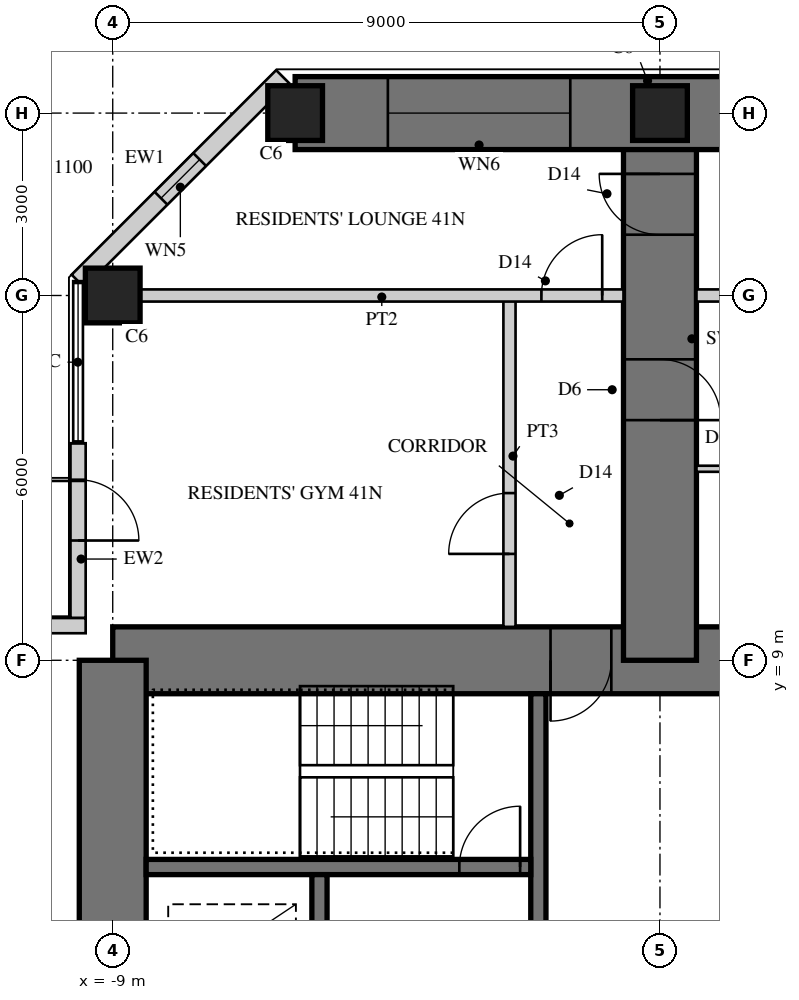
"""IFC4 building model, lengths in metres.
Left out: names, types, materials, properties, quantities, classifications, styles, units other than length and angle.
Written with IfcOpenShell. Run it as: python <this file> out.ifc"""

import sys

from ifc_helpers import new_model, si_unit, direction, frame, frame_2d, origin, origin_2d, place, context, subcontext, project, spatial, rectangle, hollow_rectangle, extrude, element, fill, save


model = new_model("IFC4")
c1 = context("Model", 3, precision=1e-05, world=origin(), true_north=direction((0.0, 1.0)))
c2 = subcontext(c1, "Body", "Model", "MODEL_VIEW")
j1 = project(units=[si_unit("LENGTHUNIT", "METRE"), si_unit("PLANEANGLEUNIT", "RADIAN")], contexts=[c1])
p1 = place(None, origin())
s1 = spatial("IfcSite", under=j1, at=p1, CompositionType="ELEMENT")
p2 = place(p1, origin())
s2 = spatial("IfcBuilding", under=s1, at=p2, CompositionType="ELEMENT")
p3 = place(p2, frame((0.0, 0.0, 169.5)))
s3 = spatial("IfcBuildingStorey", under=s2, at=p3, CompositionType="ELEMENT", Elevation=169.5)
p4 = place(p3, frame((9.0, 9.0, 0.0), z_axis=(0.0, 0.0, 1.0), x_axis=(-1.0, 0.0, 0.0)))
e1 = element("IfcWall", 1, at=p4, inside=s3, PredefinedType="SHEAR", context=c2, shape_type="SweptSolid", body=[
    extrude(rectangle(XDim=18.0, YDim=1.1, at=frame_2d((9.0, 0.0))), origin(), (0.0, 0.0, 1.0), 3.4),
])
p5 = place(p4, frame((9.8, 0.0, 0.0)))
e2 = element("IfcOpeningElement", 2, at=p5, cuts=e1, PredefinedType="OPENING", context=c2, shape_type="SweptSolid", body=[
    extrude(rectangle(XDim=1.0, YDim=2.4, at=frame_2d((0.5, 1.2))), frame((0.0, 0.56, 0.0), z_axis=(0.0, -1.0, 0.0), x_axis=(1.0, 0.0, 0.0)), (0.0, 0.0, 1.0), 1.12),
])
p6 = place(p3, frame((-9.0, 9.0, 0.0), z_axis=(0.0, 0.0, 1.0), x_axis=(0.0, -1.0, 0.0)))
e3 = element("IfcWall", 3, at=p6, inside=s3, PredefinedType="SHEAR", context=c2, shape_type="SweptSolid", body=[
    extrude(rectangle(XDim=18.0, YDim=1.1, at=frame_2d((9.0, 0.0))), origin(), (0.0, 0.0, 1.0), 3.4),
])
p7 = place(p6, frame((9.8, 0.0, 0.0)))
e4 = element("IfcOpeningElement", 4, at=p7, cuts=e3, PredefinedType="OPENING", context=c2, shape_type="SweptSolid", body=[
    extrude(rectangle(XDim=1.0, YDim=2.4, at=frame_2d((0.5, 1.2))), frame((0.0, 0.56, 0.0), z_axis=(0.0, -1.0, 0.0), x_axis=(1.0, 0.0, 0.0)), (0.0, 0.0, 1.0), 1.12),
])
p8 = place(p3, frame((-2.0, 1.675, 0.0), z_axis=(0.0, 0.0, 1.0), x_axis=(0.0, 1.0, 0.0)))
e5 = element("IfcWall", 5, at=p8, inside=s3, PredefinedType="SHEAR", context=c2, shape_type="SweptSolid", body=[
    extrude(rectangle(XDim=6.775, YDim=0.25, at=frame_2d((3.387, 0.0))), origin(), (0.0, 0.0, 1.0), 3.4),
])
p9 = place(p8, frame((0.725, 0.0, 0.0)))
e6 = element("IfcOpeningElement", 6, at=p9, cuts=e5, PredefinedType="OPENING", context=c2, shape_type="SweptSolid", body=[
    extrude(rectangle(XDim=1.0, YDim=2.1, at=frame_2d((0.5, 1.05))), frame((0.0, 0.135, 0.0), z_axis=(0.0, -1.0, 0.0), x_axis=(1.0, 0.0, 0.0)), (0.0, 0.0, 1.0), 0.27),
])
p10 = place(p3, frame((-2.125, 5.6, 0.0), z_axis=(0.0, 0.0, 1.0), x_axis=(-1.0, 0.0, 0.0)))
e7 = element("IfcWall", 7, at=p10, inside=s3, PredefinedType="SHEAR", context=c2, shape_type="SweptSolid", body=[
    extrude(rectangle(XDim=6.325, YDim=0.25, at=frame_2d((3.163, 0.0))), origin(), (0.0, 0.0, 1.0), 3.4),
])
p11 = place(p10, frame((0.175, 0.0, 0.0)))
e8 = element("IfcOpeningElement", 8, at=p11, cuts=e7, PredefinedType="OPENING", context=c2, shape_type="SweptSolid", body=[
    extrude(rectangle(XDim=1.0, YDim=2.1, at=frame_2d((0.5, 1.05))), frame((0.0, 0.135, 0.0), z_axis=(0.0, -1.0, 0.0), x_axis=(1.0, 0.0, 0.0)), (0.0, 0.0, 1.0), 0.27),
])
p12 = place(p3, frame((-5.6, 1.925, 0.0), z_axis=(0.0, 0.0, 1.0), x_axis=(0.0, 1.0, 0.0)))
e9 = element("IfcWall", 9, at=p12, inside=s3, PredefinedType="SHEAR", context=c2, shape_type="SweptSolid", body=[
    extrude(rectangle(XDim=3.55, YDim=0.25, at=frame_2d((1.775, 0.0))), origin(), (0.0, 0.0, 1.0), 3.4),
])
p13 = place(p12, frame((1.525, 0.0, 0.0)))
e10 = element("IfcOpeningElement", 10, at=p13, cuts=e9, PredefinedType="OPENING", context=c2, shape_type="SweptSolid", body=[
    extrude(rectangle(XDim=1.1, YDim=2.2, at=frame_2d((0.55, 1.1))), frame((0.0, 0.135, 0.0), z_axis=(0.0, -1.0, 0.0), x_axis=(1.0, 0.0, 0.0)), (0.0, 0.0, 1.0), 0.27),
])
p14 = place(p12, frame((0.075, 0.0, 0.0)))
e11 = element("IfcOpeningElement", 11, at=p14, cuts=e9, PredefinedType="OPENING", context=c2, shape_type="SweptSolid", body=[
    extrude(rectangle(XDim=0.8, YDim=2.1, at=frame_2d((0.4, 1.05))), frame((0.0, 0.135, 0.0), z_axis=(0.0, -1.0, 0.0), x_axis=(1.0, 0.0, 0.0)), (0.0, 0.0, 1.0), 0.27),
])
p15 = place(p3, frame((0.0, 9.0, 0.0), z_axis=(0.0, 0.0, 1.0), x_axis=(0.0, 1.0, 0.0)))
e12 = element("IfcWall", 12, at=p15, inside=s3, PredefinedType="SHEAR", context=c2, shape_type="SweptSolid", body=[
    extrude(rectangle(XDim=9.0, YDim=1.2, at=frame_2d((4.5, 0.0))), origin(), (0.0, 0.0, 1.0), 3.4),
])
p16 = place(p15, frame((3.95, 0.0, 0.0)))
e13 = element("IfcOpeningElement", 13, at=p16, cuts=e12, PredefinedType="OPENING", context=c2, shape_type="SweptSolid", body=[
    extrude(rectangle(XDim=1.0, YDim=2.15, at=frame_2d((0.5, 1.075))), frame((0.0, 0.61, 0.0), z_axis=(0.0, -1.0, 0.0), x_axis=(1.0, 0.0, 0.0)), (0.0, 0.0, 1.0), 1.22),
])
p17 = place(p15, frame((7.0, 0.0, 0.0)))
e14 = element("IfcOpeningElement", 14, at=p17, cuts=e12, PredefinedType="OPENING", context=c2, shape_type="SweptSolid", body=[
    extrude(rectangle(XDim=1.0, YDim=2.2, at=frame_2d((0.5, 1.1))), frame((0.0, 0.61, 0.0), z_axis=(0.0, -1.0, 0.0), x_axis=(1.0, 0.0, 0.0)), (0.0, 0.0, 1.0), 1.22),
])
p18 = place(p3, frame((6.0, 18.0, 0.0), z_axis=(0.0, 0.0, 1.0), x_axis=(-1.0, 0.0, 0.0)))
e15 = element("IfcWall", 15, at=p18, inside=s3, PredefinedType="SHEAR", context=c2, shape_type="SweptSolid", body=[
    extrude(rectangle(XDim=12.0, YDim=1.2, at=frame_2d((6.0, 0.0))), origin(), (0.0, 0.0, 1.0), 3.4),
])
p19 = place(p18, frame((1.525, 0.0, 0.6)))
e16 = element("IfcOpeningElement", 16, at=p19, cuts=e15, PredefinedType="OPENING", context=c2, shape_type="SweptSolid", body=[
    extrude(rectangle(XDim=3.0, YDim=2.4, at=frame_2d((1.5, 1.2))), frame((0.0, 0.61, 0.0), z_axis=(0.0, -1.0, 0.0), x_axis=(1.0, 0.0, 0.0)), (0.0, 0.0, 1.0), 1.22),
])
p20 = place(p18, frame((7.475, 0.0, 0.6)))
e17 = element("IfcOpeningElement", 17, at=p20, cuts=e15, PredefinedType="OPENING", context=c2, shape_type="SweptSolid", body=[
    extrude(rectangle(XDim=3.0, YDim=2.4, at=frame_2d((1.5, 1.2))), frame((0.0, 0.61, 0.0), z_axis=(0.0, -1.0, 0.0), x_axis=(1.0, 0.0, 0.0)), (0.0, 0.0, 1.0), 1.22),
])
for number, where, z_axis, x_axis in (
    (18, (-9.0, 15.0, 0.0), (0.0, 0.0, 1.0), (1.0, 0.0, 0.0)),
    (19, (0.0, 18.0, 0.0), (0.0, 0.0, 1.0), (1.0, 0.0, 0.0)),
    (20, (-6.0, 18.0, 0.0), (0.0, 0.0, 1.0), (1.0, 0.0, 0.0)),
):
    element("IfcColumn", number, at=place(p3, frame(where, z_axis=z_axis, x_axis=x_axis)), inside=s3, PredefinedType="COLUMN", context=c2, shape_type="SweptSolid", body=[
        extrude(rectangle(XDim=0.9, YDim=0.9, at=origin_2d()), origin(), (0.0, 0.0, 1.0), 3.4),
    ])
p21 = place(p3, frame((-6.206, 18.6, 0.0), z_axis=(0.0, 0.0, 1.0), x_axis=(-0.707106781187, -0.707106781187, 0.0)))
e21 = element("IfcWall", 21, at=p21, inside=s3, PredefinedType="SOLIDWALL", context=c2, shape_type="SweptSolid", body=[
    extrude(rectangle(XDim=4.757, YDim=0.3, at=frame_2d((2.379, 0.0))), origin(), (0.0, 0.0, 1.0), 3.22),
])
p22 = place(p21, frame((1.929, 0.0, 0.3)))
e22 = element("IfcOpeningElement", 22, at=p22, cuts=e21, PredefinedType="OPENING", context=c2, shape_type="SweptSolid", body=[
    extrude(rectangle(XDim=0.9, YDim=2.4, at=frame_2d((0.45, 1.2))), frame((0.0, 0.16, 0.0), z_axis=(0.0, -1.0, 0.0), x_axis=(1.0, 0.0, 0.0)), (0.0, 0.0, 1.0), 0.32),
])
p23 = place(p3, frame((-9.57, 12.57, 0.0), z_axis=(0.0, 0.0, 1.0), x_axis=(0.0, -1.0, 0.0)))
e23 = element("IfcWall", 23, at=p23, inside=s3, PredefinedType="SOLIDWALL", context=c2, shape_type="SweptSolid", body=[
    extrude(rectangle(XDim=2.875, YDim=0.25, at=frame_2d((1.438, 0.0))), origin(), (0.0, 0.0, 1.0), 3.22),
])
p24 = place(p23, frame((0.6, 0.0, 0.0)))
e24 = element("IfcOpeningElement", 24, at=p24, cuts=e23, PredefinedType="OPENING", context=c2, shape_type="SweptSolid", body=[
    extrude(rectangle(XDim=1.0, YDim=2.2, at=frame_2d((0.5, 1.1))), frame((0.0, 0.135, 0.0), z_axis=(0.0, -1.0, 0.0), x_axis=(1.0, 0.0, 0.0)), (0.0, 0.0, 1.0), 0.27),
])
p25 = place(p3, frame((-9.445, 9.57, 0.0), z_axis=(0.0, 0.0, 1.0), x_axis=(-1.0, 0.0, 0.0)))
e25 = element("IfcWall", 25, at=p25, inside=s3, PredefinedType="SOLIDWALL", context=c2, shape_type="SweptSolid", body=[
    extrude(rectangle(XDim=3.125, YDim=0.25, at=frame_2d((1.562, 0.0))), origin(), (0.0, 0.0, 1.0), 3.22),
])
p26 = place(p25, frame((0.6, 0.0, 0.0)))
e26 = element("IfcOpeningElement", 26, at=p26, cuts=e25, PredefinedType="OPENING", context=c2, shape_type="SweptSolid", body=[
    extrude(rectangle(XDim=1.0, YDim=2.2, at=frame_2d((0.5, 1.1))), frame((0.0, 0.135, 0.0), z_axis=(0.0, -1.0, 0.0), x_axis=(1.0, 0.0, 0.0)), (0.0, 0.0, 1.0), 0.27),
])
p27 = place(p3, frame((2.8, 12.15, 0.0), z_axis=(0.0, 0.0, 1.0), x_axis=(-1.0, 0.0, 0.0)))
e27 = element("IfcWall", 27, at=p27, inside=s3, PredefinedType="PARTITIONING", context=c2, shape_type="SweptSolid", body=[
    extrude(rectangle(XDim=2.2, YDim=0.1, at=frame_2d((1.1, 0.0))), origin(), (0.0, 0.0, 1.0), 3.22),
])
p28 = place(p27, frame((0.55, 0.0, 0.0)))
e28 = element("IfcOpeningElement", 28, at=p28, cuts=e27, PredefinedType="OPENING", context=c2, shape_type="SweptSolid", body=[
    extrude(rectangle(XDim=0.9, YDim=2.1, at=frame_2d((0.45, 1.05))), frame((0.0, 0.06, 0.0), z_axis=(0.0, -1.0, 0.0), x_axis=(1.0, 0.0, 0.0)), (0.0, 0.0, 1.0), 0.12),
])
p29 = place(p3, frame((-2.475, 9.55, 0.0), z_axis=(0.0, 0.0, 1.0), x_axis=(0.0, 1.0, 0.0)))
e29 = element("IfcWall", 29, at=p29, inside=s3, PredefinedType="SOLIDWALL", context=c2, shape_type="SweptSolid", body=[
    extrude(rectangle(XDim=5.45, YDim=0.2, at=frame_2d((2.725, 0.0))), origin(), (0.0, 0.0, 1.0), 3.22),
])
p30 = place(p29, frame((1.2, 0.0, 0.0)))
e30 = element("IfcOpeningElement", 30, at=p30, cuts=e29, PredefinedType="OPENING", context=c2, shape_type="SweptSolid", body=[
    extrude(rectangle(XDim=1.0, YDim=2.2, at=frame_2d((0.5, 1.1))), frame((0.0, 0.11, 0.0), z_axis=(0.0, -1.0, 0.0), x_axis=(1.0, 0.0, 0.0)), (0.0, 0.0, 1.0), 0.22),
])
p31 = place(p3, frame((8.55, 15.0, 0.0), z_axis=(0.0, 0.0, 1.0), x_axis=(-1.0, 0.0, 0.0)))
e31 = element("IfcWall", 31, at=p31, inside=s3, PredefinedType="SOLIDWALL", context=c2, shape_type="SweptSolid", body=[
    extrude(rectangle(XDim=7.95, YDim=0.2, at=frame_2d((3.975, 0.0))), origin(), (0.0, 0.0, 1.0), 2.47),
])
p32 = place(p3, frame((-0.6, 15.0, 0.0), z_axis=(0.0, 0.0, 1.0), x_axis=(-1.0, 0.0, 0.0)))
e32 = element("IfcWall", 32, at=p32, inside=s3, PredefinedType="SOLIDWALL", context=c2, shape_type="SweptSolid", body=[
    extrude(rectangle(XDim=7.95, YDim=0.2, at=frame_2d((3.975, 0.0))), origin(), (0.0, 0.0, 1.0), 2.47),
])
p33 = place(p32, frame((0.35, 0.0, 0.0)))
e33 = element("IfcOpeningElement", 33, at=p33, cuts=e32, PredefinedType="OPENING", context=c2, shape_type="SweptSolid", body=[
    extrude(rectangle(XDim=1.0, YDim=2.2, at=frame_2d((0.5, 1.1))), frame((0.0, 0.11, 0.0), z_axis=(0.0, -1.0, 0.0), x_axis=(1.0, 0.0, 0.0)), (0.0, 0.0, 1.0), 0.22),
])
p34 = place(p20, origin())
e34 = element("IfcWindow", 34, at=p34, inside=s3, PartitioningType="SINGLE_PANEL", PredefinedType="WINDOW", context=c2, shape_type="SweptSolid", body=[
    extrude(hollow_rectangle(XDim=3.0, YDim=2.4, WallThickness=0.06, at=frame_2d((1.5, 1.2))), frame((0.0, 0.03, 0.0), z_axis=(0.0, -1.0, 0.0), x_axis=(1.0, 0.0, 0.0)), (0.0, 0.0, 1.0), 0.06),
    extrude(rectangle(XDim=2.879, YDim=2.279, at=frame_2d((1.5, 1.2))), frame((0.0, 0.03, 0.0), z_axis=(0.0, -1.0, 0.0), x_axis=(1.0, 0.0, 0.0)), (0.0, 0.0, 1.0), 0.06),
])
fill(e17, e34)
p35 = place(p22, origin())
e35 = element("IfcWindow", 35, at=p35, inside=s3, PartitioningType="SINGLE_PANEL", PredefinedType="WINDOW", context=c2, shape_type="SweptSolid", body=[
    extrude(hollow_rectangle(XDim=0.9, YDim=2.4, WallThickness=0.06, at=frame_2d((0.45, 1.2))), frame((0.0, 0.03, 0.0), z_axis=(0.0, -1.0, 0.0), x_axis=(1.0, 0.0, 0.0)), (0.0, 0.0, 1.0), 0.06),
    extrude(rectangle(XDim=0.779, YDim=2.279, at=frame_2d((0.45, 1.2))), frame((0.0, 0.03, 0.0), z_axis=(0.0, -1.0, 0.0), x_axis=(1.0, 0.0, 0.0)), (0.0, 0.0, 1.0), 0.06),
])
fill(e22, e35)
p36 = place(p24, origin())
e36 = element("IfcDoor", 36, at=p36, inside=s3, OperationType="SINGLE_SWING_RIGHT", PredefinedType="DOOR", context=c2, shape_type="SweptSolid", body=[
    extrude(hollow_rectangle(XDim=1.0, YDim=2.2, WallThickness=0.06, at=frame_2d((0.5, 1.1))), frame((0.0, 0.025, 0.0), z_axis=(0.0, -1.0, 0.0), x_axis=(1.0, 0.0, 0.0)), (0.0, 0.0, 1.0), 0.05),
    extrude(rectangle(XDim=0.879, YDim=2.079, at=frame_2d((0.5, 1.1))), frame((0.0, 0.025, 0.0), z_axis=(0.0, -1.0, 0.0), x_axis=(1.0, 0.0, 0.0)), (0.0, 0.0, 1.0), 0.05),
])
fill(e24, e36)
p37 = place(p30, origin())
e37 = element("IfcDoor", 37, at=p37, inside=s3, OperationType="SINGLE_SWING_LEFT", PredefinedType="DOOR", context=c2, shape_type="SweptSolid", body=[
    extrude(rectangle(XDim=1.0, YDim=2.2, at=frame_2d((0.5, 1.1))), frame((0.0, 0.025, 0.0), z_axis=(0.0, -1.0, 0.0), x_axis=(1.0, 0.0, 0.0)), (0.0, 0.0, 1.0), 0.05),
])
fill(e30, e37)
p38 = place(p33, frame((1.0, 0.0, 0.0), z_axis=(0.0, 0.0, 1.0), x_axis=(-1.0, 0.0, 0.0)))
e38 = element("IfcDoor", 38, at=p38, inside=s3, OperationType="SINGLE_SWING_RIGHT", PredefinedType="DOOR", context=c2, shape_type="SweptSolid", body=[
    extrude(rectangle(XDim=1.0, YDim=2.2, at=frame_2d((0.5, 1.1))), frame((0.0, 0.025, 0.0), z_axis=(0.0, -1.0, 0.0), x_axis=(1.0, 0.0, 0.0)), (0.0, 0.0, 1.0), 0.05),
])
fill(e33, e38)
p39 = place(p16, frame((1.0, 0.0, 0.0), z_axis=(0.0, 0.0, 1.0), x_axis=(-1.0, 0.0, 0.0)))
e39 = element("IfcDoor", 39, at=p39, inside=s3, OperationType="SINGLE_SWING_RIGHT", PredefinedType="DOOR", context=c2, shape_type="SweptSolid", body=[
    extrude(rectangle(XDim=1.0, YDim=2.15, at=frame_2d((0.5, 1.075))), frame((0.0, 0.025, 0.0), z_axis=(0.0, -1.0, 0.0), x_axis=(1.0, 0.0, 0.0)), (0.0, 0.0, 1.0), 0.05),
])
fill(e13, e39)
p40 = place(p17, origin())
e40 = element("IfcDoor", 40, at=p40, inside=s3, OperationType="SINGLE_SWING_RIGHT", PredefinedType="DOOR", context=c2, shape_type="SweptSolid", body=[
    extrude(rectangle(XDim=1.0, YDim=2.2, at=frame_2d((0.5, 1.1))), frame((0.0, 0.025, 0.0), z_axis=(0.0, -1.0, 0.0), x_axis=(1.0, 0.0, 0.0)), (0.0, 0.0, 1.0), 0.05),
])
fill(e14, e40)
p41 = place(p5, origin())
e41 = element("IfcDoor", 41, at=p41, inside=s3, OperationType="SINGLE_SWING_RIGHT", PredefinedType="DOOR", context=c2, shape_type="SweptSolid", body=[
    extrude(rectangle(XDim=1.0, YDim=2.4, at=frame_2d((0.5, 1.2))), frame((0.0, 0.055, 0.0), z_axis=(0.0, -1.0, 0.0), x_axis=(1.0, 0.0, 0.0)), (0.0, 0.0, 1.0), 0.05),
])
fill(e2, e41)
p42 = place(p11, frame((1.0, 0.0, 0.0), z_axis=(0.0, 0.0, 1.0), x_axis=(-1.0, 0.0, 0.0)))
e42 = element("IfcDoor", 42, at=p42, inside=s3, OperationType="SINGLE_SWING_RIGHT", PredefinedType="DOOR", context=c2, shape_type="SweptSolid", body=[
    extrude(rectangle(XDim=1.0, YDim=2.1, at=frame_2d((0.5, 1.05))), frame((0.0, 0.025, 0.0), z_axis=(0.0, -1.0, 0.0), x_axis=(1.0, 0.0, 0.0)), (0.0, 0.0, 1.0), 0.05),
])
fill(e8, e42)
save(model, sys.argv[1])
